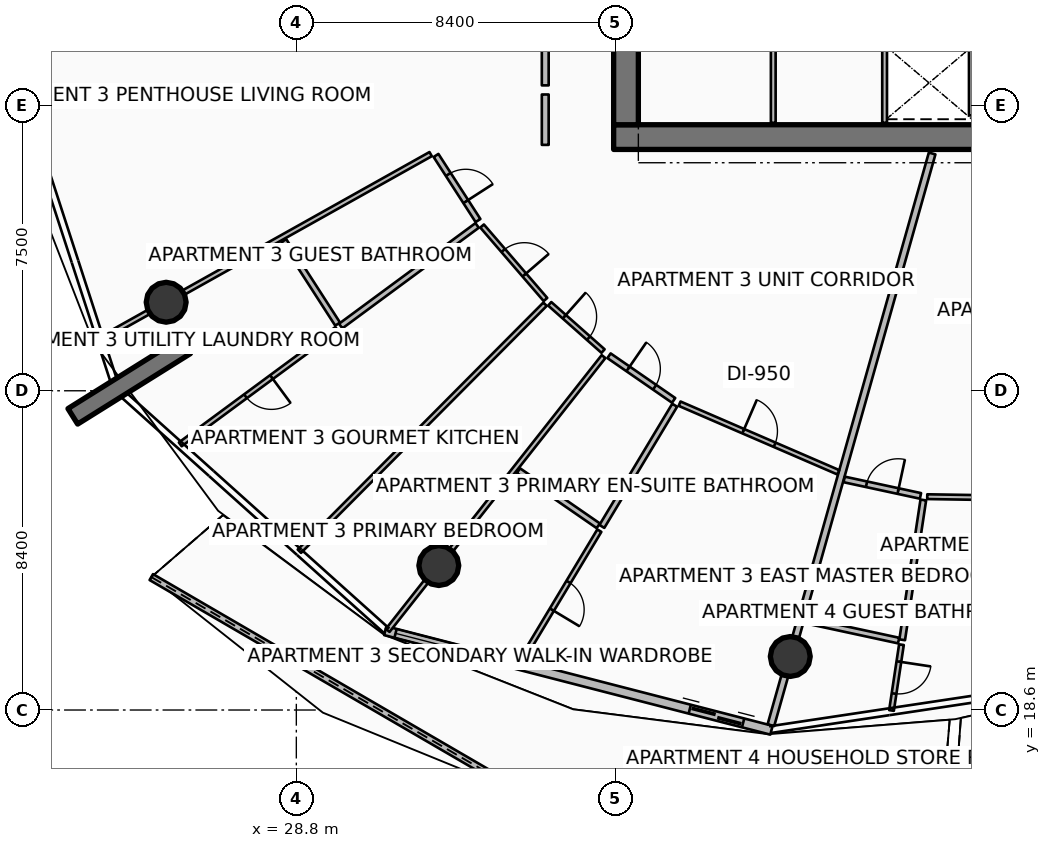
"""IFC4 building model, lengths in metres.
Left out: names, types, materials, properties, quantities, classifications, styles, units other than length and angle.
Written with IfcOpenShell. Run it as: python <this file> out.ifc"""

import sys

from ifc_helpers import new_model, si_unit, direction, frame, frame_2d, origin, origin_2d, place, context, subcontext, project, spatial, polyline, rectangle, circle, outline, extrude, element, fill, save


model = new_model("IFC4")
c1 = context("Model", 3, precision=1e-05, world=origin(), true_north=direction((0.0, 1.0)))
c2 = subcontext(c1, "Body", "Model", "MODEL_VIEW")
j1 = project(units=[si_unit("LENGTHUNIT", "METRE"), si_unit("PLANEANGLEUNIT", "RADIAN")], contexts=[c1])
p1 = place(None, origin())
s1 = spatial("IfcSite", under=j1, at=p1, CompositionType="ELEMENT")
p2 = place(p1, origin())
s2 = spatial("IfcBuilding", under=s1, at=p2, CompositionType="ELEMENT")
p3 = place(p2, frame((0.0, 0.0, 180.3)))
s3 = spatial("IfcBuildingStorey", under=s2, at=p3, CompositionType="ELEMENT", Elevation=180.3)
p4 = place(p3, frame((37.15, 33.675, 0.0), z_axis=(0.0, 0.0, 1.0), x_axis=(1.0, 0.0, 0.0)))
e1 = element("IfcWall", 1, at=p4, inside=s3, PredefinedType="SHEAR", context=c2, shape_type="SweptSolid", body=[
    extrude(rectangle(XDim=9.75, YDim=0.65, at=frame_2d((4.875, 0.0))), origin(), (0.0, 0.0, 1.0), 3.75),
])
p5 = place(p3, frame((37.475, 34.0, 0.0), z_axis=(0.0, 0.0, 1.0), x_axis=(0.0, 1.0, 0.0)))
e2 = element("IfcWall", 2, at=p5, inside=s3, PredefinedType="SHEAR", context=c2, shape_type="SweptSolid", body=[
    extrude(rectangle(XDim=16.0, YDim=0.65, at=frame_2d((8.0, 0.0))), origin(), (0.0, 0.0, 1.0), 3.75),
])
p6 = place(p3, frame((25.886, 28.182, 0.0), z_axis=(0.0, 0.0, 1.0), x_axis=(-0.848033572426, -0.529942506352, 0.0)))
e3 = element("IfcWall", 3, at=p6, inside=s3, PredefinedType="SOLIDWALL", context=c2, shape_type="SweptSolid", body=[
    extrude(rectangle(XDim=3.5, YDim=0.48, at=frame_2d((1.75, 0.0))), origin(), (0.0, 0.0, 1.0), 3.75),
])
for number, where, z_axis, x_axis in (
    (4, (25.375, 29.329, 0.0), (0.0, 0.0, 1.0), (1.0, 0.0, 0.0)),
    (5, (32.549, 22.401, 0.0), (0.0, 0.0, 1.0), (1.0, 0.0, 0.0)),
    (6, (41.798, 20.008, 0.0), (0.0, 0.0, 1.0), (1.0, 0.0, 0.0)),
):
    element("IfcColumn", number, at=place(p3, frame(where, z_axis=z_axis, x_axis=x_axis)), inside=s3, PredefinedType="COLUMN", context=c2, shape_type="SweptSolid", body=[
        extrude(circle(Radius=0.525, at=origin_2d()), origin(), (0.0, 0.0, 1.0), 3.5),
    ])
p7 = place(p3, frame((24.984, 22.098, 0.0), z_axis=(0.0, 0.0, 1.0), x_axis=(0.864391947404, -0.502818616663, 0.0)))
e7 = element("IfcWall", 7, at=p7, inside=s3, PredefinedType="PARAPET", context=c2, shape_type="SweptSolid", body=[
    extrude(outline(polyline([(0.0, 0.0), (11.37, 0.0), (11.37, 1.832), (5.685, 1.853), (0.0, 1.756), (0.0, 0.0)])), frame((0.0, 0.09, 0.0), z_axis=(0.0, -1.0, 0.0), x_axis=(1.0, 0.0, 0.0)), (0.0, 0.0, 1.0), 0.18),
])
p8 = place(p3, frame((46.135, 16.298, 0.0), z_axis=(0.0, 0.0, 1.0), x_axis=(0.956822857871, 0.290671668135, 0.0)))
e8 = element("IfcWall", 8, at=p8, inside=s3, PredefinedType="PARAPET", context=c2, shape_type="SweptSolid", body=[
    extrude(outline(polyline([(0.0, 0.0), (9.598, 0.0), (9.598, 1.148), (4.799, 1.284), (0.0, 1.483), (0.0, 0.0)])), frame((0.0, 0.09, 0.0), z_axis=(0.0, -1.0, 0.0), x_axis=(1.0, 0.0, 0.0)), (0.0, 0.0, 1.0), 0.18),
])
p9 = place(p3, frame((31.14, 20.687, 0.0), z_axis=(0.0, 0.0, 1.0), x_axis=(0.968374028006, -0.249502989727, 0.0)))
e9 = element("IfcWall", 9, at=p9, inside=s3, PredefinedType="SOLIDWALL", context=c2, shape_type="SweptSolid", body=[
    extrude(rectangle(XDim=10.494, YDim=0.24, at=frame_2d((5.247, 0.0))), origin(), (0.0, 0.0, 1.0), 2.45),
])
p10 = place(p9, frame((8.274, 0.0, 0.0)))
e10 = element("IfcOpeningElement", 10, at=p10, cuts=e9, PredefinedType="OPENING", context=c2, shape_type="SweptSolid", body=[
    extrude(rectangle(XDim=1.45, YDim=2.15, at=frame_2d((0.725, 1.075))), frame((0.0, 0.13, 0.0), z_axis=(0.0, -1.0, 0.0), x_axis=(1.0, 0.0, 0.0)), (0.0, 0.0, 1.0), 0.26),
])
p11 = place(p9, frame((0.28, 0.0, 0.65)))
e11 = element("IfcOpeningElement", 11, at=p11, cuts=e9, PredefinedType="OPENING", context=c2, shape_type="SweptSolid", body=[
    extrude(rectangle(XDim=1.6, YDim=1.5, at=frame_2d((0.8, 0.75))), frame((0.0, 0.13, 0.0), z_axis=(0.0, -1.0, 0.0), x_axis=(1.0, 0.0, 0.0)), (0.0, 0.0, 1.0), 0.26),
])
p12 = place(p3, frame((46.58, 34.245, 0.0), z_axis=(0.0, 0.0, 1.0), x_axis=(0.0, 1.0, 0.0)))
e12 = element("IfcWall", 12, at=p12, inside=s3, PredefinedType="PARTITIONING", context=c2, shape_type="SweptSolid", body=[
    extrude(rectangle(XDim=1.71, YDim=0.16, at=frame_2d((0.855, 0.0))), origin(), (0.0, 0.0, 1.0), 3.5),
])
for number, where, z_axis, x_axis in (
    (13, (44.28, 34.05, 0.0), (0.0, 0.0, 1.0), (0.0, 1.0, 0.0)),
    (14, (41.35, 34.05, 0.0), (0.0, 0.0, 1.0), (0.0, 1.0, 0.0)),
):
    element("IfcWall", number, at=place(p3, frame(where, z_axis=z_axis, x_axis=x_axis)), inside=s3, PredefinedType="PARTITIONING", context=c2, shape_type="SweptSolid", body=[
        extrude(rectangle(XDim=2.03, YDim=0.125, at=frame_2d((1.015, 0.0))), origin(), (0.0, 0.0, 1.0), 2.94),
    ])
p13 = place(p3, frame((45.531, 33.244, 0.0), z_axis=(0.0, 0.0, 1.0), x_axis=(-0.271437162306, -0.962456163635, 0.0)))
e15 = element("IfcWall", 15, at=p13, inside=s3, PredefinedType="PARTITIONING", context=c2, shape_type="SweptSolid", body=[
    extrude(rectangle(XDim=15.63, YDim=0.18, at=frame_2d((7.815, 0.0))), origin(), (0.0, 0.0, 1.0), 2.94),
])
p14 = place(p3, frame((35.35, 40.383, 0.0), z_axis=(0.0, 0.0, 1.0), x_axis=(0.0, -1.0, 0.0)))
e16 = element("IfcWall", 16, at=p14, inside=s3, PredefinedType="PARTITIONING", context=c2, shape_type="SweptSolid", body=[
    extrude(rectangle(XDim=5.347, YDim=0.18, at=frame_2d((2.674, 0.0))), origin(), (0.0, 0.0, 1.0), 2.94),
])
p15 = place(p14, frame((2.124, 0.0, 0.0)))
e17 = element("IfcOpeningElement", 17, at=p15, cuts=e16, PredefinedType="OPENING", context=c2, shape_type="SweptSolid", body=[
    extrude(rectangle(XDim=1.1, YDim=2.1, at=frame_2d((0.55, 1.05))), frame((0.0, 0.1, 0.0), z_axis=(0.0, -1.0, 0.0), x_axis=(1.0, 0.0, 0.0)), (0.0, 0.0, 1.0), 0.2),
])
p16 = place(p3, frame((35.35, 34.796, 0.0), z_axis=(0.0, 0.0, 1.0), x_axis=(0.0, -1.0, 0.0)))
e18 = element("IfcWall", 18, at=p16, inside=s3, PredefinedType="PARTITIONING", context=c2, shape_type="SweptSolid", body=[
    extrude(rectangle(XDim=1.326, YDim=0.18, at=frame_2d((0.663, 0.0))), origin(), (0.0, 0.0, 1.0), 2.94),
])
p17 = place(p3, frame((32.334, 33.227, 0.0), z_axis=(0.0, 0.0, 1.0), x_axis=(-0.872500152392, -0.488613839424, 0.0)))
e19 = element("IfcWall", 19, at=p17, inside=s3, PredefinedType="PARTITIONING", context=c2, shape_type="SweptSolid", body=[
    extrude(rectangle(XDim=9.94, YDim=0.125, at=frame_2d((4.97, 0.0))), origin(), (0.0, 0.0, 1.0), 2.94),
])
p18 = place(p3, frame((32.476, 33.192, 0.0), z_axis=(0.0, 0.0, 1.0), x_axis=(0.542143239932, -0.840286086637, 0.0)))
e20 = element("IfcWall", 20, at=p18, inside=s3, PredefinedType="PARTITIONING", context=c2, shape_type="SweptSolid", body=[
    extrude(rectangle(XDim=2.038, YDim=0.15, at=frame_2d((1.019, 0.0))), origin(), (0.0, 0.0, 1.0), 2.94),
])
p19 = place(p18, frame((0.594, 0.0, 0.0)))
e21 = element("IfcOpeningElement", 21, at=p19, cuts=e20, PredefinedType="OPENING", context=c2, shape_type="SweptSolid", body=[
    extrude(rectangle(XDim=0.85, YDim=2.06, at=frame_2d((0.425, 1.03))), frame((0.0, 0.085, 0.0), z_axis=(0.0, -1.0, 0.0), x_axis=(1.0, 0.0, 0.0)), (0.0, 0.0, 1.0), 0.17),
])
p20 = place(p3, frame((28.471, 30.949, 0.0), z_axis=(0.0, 0.0, 1.0), x_axis=(0.542080018781, -0.840326872853, 0.0)))
e22 = element("IfcWall", 22, at=p20, inside=s3, PredefinedType="PARTITIONING", context=c2, shape_type="SweptSolid", body=[
    extrude(rectangle(XDim=2.611, YDim=0.15, at=frame_2d((1.306, 0.0))), origin(), (0.0, 0.0, 1.0), 2.94),
])
p21 = place(p3, frame((33.557, 31.35, 0.0), z_axis=(0.0, 0.0, 1.0), x_axis=(-0.804841149106, -0.593490290322, 0.0)))
e23 = element("IfcWall", 23, at=p21, inside=s3, PredefinedType="PARTITIONING", context=c2, shape_type="SweptSolid", body=[
    extrude(rectangle(XDim=4.46, YDim=0.15, at=frame_2d((2.23, 0.0))), origin(), (0.0, 0.0, 1.0), 2.94),
])
p22 = place(p3, frame((29.863, 28.626, 0.0), z_axis=(0.0, 0.0, 1.0), x_axis=(-0.804842237675, -0.593488814094, 0.0)))
e24 = element("IfcWall", 24, at=p22, inside=s3, PredefinedType="PARTITIONING", context=c2, shape_type="SweptSolid", body=[
    extrude(rectangle(XDim=5.115, YDim=0.125, at=frame_2d((2.558, 0.0))), origin(), (0.0, 0.0, 1.0), 2.94),
])
p23 = place(p22, frame((2.133, 0.0, 0.0)))
e25 = element("IfcOpeningElement", 25, at=p23, cuts=e24, PredefinedType="OPENING", context=c2, shape_type="SweptSolid", body=[
    extrude(rectangle(XDim=0.85, YDim=2.06, at=frame_2d((0.425, 1.03))), frame((0.0, 0.073, 0.0), z_axis=(0.0, -1.0, 0.0), x_axis=(1.0, 0.0, 0.0)), (0.0, 0.0, 1.0), 0.145),
])
p24 = place(p3, frame((35.344, 29.277, 0.0), z_axis=(0.0, 0.0, 1.0), x_axis=(-0.705226489462, -0.708982086206, 0.0)))
e26 = element("IfcWall", 26, at=p24, inside=s3, PredefinedType="PARTITIONING", context=c2, shape_type="SweptSolid", body=[
    extrude(rectangle(XDim=9.166, YDim=0.125, at=frame_2d((4.583, 0.0))), origin(), (0.0, 0.0, 1.0), 2.94),
])
p25 = place(p3, frame((33.688, 31.335, 0.0), z_axis=(0.0, 0.0, 1.0), x_axis=(0.653119308398, -0.757255022431, 0.0)))
e27 = element("IfcWall", 27, at=p25, inside=s3, PredefinedType="PARTITIONING", context=c2, shape_type="SweptSolid", body=[
    extrude(rectangle(XDim=2.553, YDim=0.125, at=frame_2d((1.277, 0.0))), origin(), (0.0, 0.0, 1.0), 2.94),
])
p26 = place(p25, frame((0.852, 0.0, 0.0)))
e28 = element("IfcOpeningElement", 28, at=p26, cuts=e27, PredefinedType="OPENING", context=c2, shape_type="SweptSolid", body=[
    extrude(rectangle(XDim=0.85, YDim=2.06, at=frame_2d((0.425, 1.03))), frame((0.0, 0.073, 0.0), z_axis=(0.0, -1.0, 0.0), x_axis=(1.0, 0.0, 0.0)), (0.0, 0.0, 1.0), 0.145),
])
p27 = place(p3, frame((35.468, 29.288, 0.0), z_axis=(0.0, 0.0, 1.0), x_axis=(0.748399816021, -0.663247853656, 0.0)))
e29 = element("IfcWall", 29, at=p27, inside=s3, PredefinedType="PARTITIONING", context=c2, shape_type="SweptSolid", body=[
    extrude(rectangle(XDim=1.875, YDim=0.125, at=frame_2d((0.938, 0.0))), origin(), (0.0, 0.0, 1.0), 2.94),
])
p28 = place(p27, frame((0.512, 0.0, 0.0)))
e30 = element("IfcOpeningElement", 30, at=p28, cuts=e29, PredefinedType="OPENING", context=c2, shape_type="SweptSolid", body=[
    extrude(rectangle(XDim=0.85, YDim=2.06, at=frame_2d((0.425, 1.03))), frame((0.0, 0.073, 0.0), z_axis=(0.0, -1.0, 0.0), x_axis=(1.0, 0.0, 0.0)), (0.0, 0.0, 1.0), 0.145),
])
p29 = place(p3, frame((36.884, 27.9, 0.0), z_axis=(0.0, 0.0, 1.0), x_axis=(-0.619094580594, -0.785316433216, 0.0)))
e31 = element("IfcWall", 31, at=p29, inside=s3, PredefinedType="PARTITIONING", context=c2, shape_type="SweptSolid", body=[
    extrude(rectangle(XDim=9.175, YDim=0.125, at=frame_2d((4.588, 0.0))), origin(), (0.0, 0.0, 1.0), 2.94),
])
p30 = place(p3, frame((37.028, 27.921, 0.0), z_axis=(0.0, 0.0, 1.0), x_axis=(0.82286796048, -0.56823262808, 0.0)))
e32 = element("IfcWall", 32, at=p30, inside=s3, PredefinedType="PARTITIONING", context=c2, shape_type="SweptSolid", body=[
    extrude(rectangle(XDim=2.066, YDim=0.15, at=frame_2d((1.033, 0.0))), origin(), (0.0, 0.0, 1.0), 2.94),
])
p31 = place(p30, frame((0.608, 0.0, 0.0)))
e33 = element("IfcOpeningElement", 33, at=p31, cuts=e32, PredefinedType="OPENING", context=c2, shape_type="SweptSolid", body=[
    extrude(rectangle(XDim=0.85, YDim=2.06, at=frame_2d((0.425, 1.03))), frame((0.0, 0.085, 0.0), z_axis=(0.0, -1.0, 0.0), x_axis=(1.0, 0.0, 0.0)), (0.0, 0.0, 1.0), 0.17),
])
p32 = place(p3, frame((34.645, 24.898, 0.0), z_axis=(0.0, 0.0, 1.0), x_axis=(0.822814907258, -0.568309447743, 0.0)))
e34 = element("IfcWall", 34, at=p32, inside=s3, PredefinedType="PARTITIONING", context=c2, shape_type="SweptSolid", body=[
    extrude(rectangle(XDim=2.553, YDim=0.15, at=frame_2d((1.276, 0.0))), origin(), (0.0, 0.0, 1.0), 2.94),
])
p33 = place(p3, frame((38.756, 26.619, 0.0), z_axis=(0.0, 0.0, 1.0), x_axis=(-0.515122954907, -0.857116293934, 0.0)))
e35 = element("IfcWall", 35, at=p33, inside=s3, PredefinedType="PARTITIONING", context=c2, shape_type="SweptSolid", body=[
    extrude(rectangle(XDim=3.72, YDim=0.15, at=frame_2d((1.86, 0.0))), origin(), (0.0, 0.0, 1.0), 2.94),
])
p34 = place(p3, frame((36.773, 23.319, 0.0), z_axis=(0.0, 0.0, 1.0), x_axis=(-0.515150775859, -0.857099573056, 0.0)))
e36 = element("IfcWall", 36, at=p34, inside=s3, PredefinedType="PARTITIONING", context=c2, shape_type="SweptSolid", body=[
    extrude(rectangle(XDim=4.0, YDim=0.125, at=frame_2d((2.0, 0.0))), origin(), (0.0, 0.0, 1.0), 2.94),
])
p35 = place(p34, frame((1.575, 0.0, 0.0)))
e37 = element("IfcOpeningElement", 37, at=p35, cuts=e36, PredefinedType="OPENING", context=c2, shape_type="SweptSolid", body=[
    extrude(rectangle(XDim=0.85, YDim=2.06, at=frame_2d((0.425, 1.03))), frame((0.0, 0.073, 0.0), z_axis=(0.0, -1.0, 0.0), x_axis=(1.0, 0.0, 0.0)), (0.0, 0.0, 1.0), 0.145),
])
p36 = place(p3, frame((38.885, 26.66, 0.0), z_axis=(0.0, 0.0, 1.0), x_axis=(0.91789982616, -0.396812183705, 0.0)))
e38 = element("IfcWall", 38, at=p36, inside=s3, PredefinedType="PARTITIONING", context=c2, shape_type="SweptSolid", body=[
    extrude(rectangle(XDim=4.55, YDim=0.125, at=frame_2d((2.275, 0.0))), origin(), (0.0, 0.0, 1.0), 2.94),
])
p37 = place(p36, frame((1.825, 0.0, 0.0)))
e39 = element("IfcOpeningElement", 39, at=p37, cuts=e38, PredefinedType="OPENING", context=c2, shape_type="SweptSolid", body=[
    extrude(rectangle(XDim=0.9, YDim=2.08, at=frame_2d((0.45, 1.04))), frame((0.0, 0.073, 0.0), z_axis=(0.0, -1.0, 0.0), x_axis=(1.0, 0.0, 0.0)), (0.0, 0.0, 1.0), 0.145),
])
p38 = place(p3, frame((43.215, 24.667, 0.0), z_axis=(0.0, 0.0, 1.0), x_axis=(0.977507597701, -0.210900204925, 0.0)))
e40 = element("IfcWall", 40, at=p38, inside=s3, PredefinedType="PARTITIONING", context=c2, shape_type="SweptSolid", body=[
    extrude(rectangle(XDim=2.055, YDim=0.15, at=frame_2d((1.027, 0.0))), origin(), (0.0, 0.0, 1.0), 2.94),
])
p39 = place(p38, frame((0.602, 0.0, 0.0)))
e41 = element("IfcOpeningElement", 41, at=p39, cuts=e40, PredefinedType="OPENING", context=c2, shape_type="SweptSolid", body=[
    extrude(rectangle(XDim=0.85, YDim=2.06, at=frame_2d((0.425, 1.03))), frame((0.0, 0.085, 0.0), z_axis=(0.0, -1.0, 0.0), x_axis=(1.0, 0.0, 0.0)), (0.0, 0.0, 1.0), 0.17),
])
p40 = place(p3, frame((42.17, 20.962, 0.0), z_axis=(0.0, 0.0, 1.0), x_axis=(0.977505473959, -0.210910048076, 0.0)))
e42 = element("IfcWall", 42, at=p40, inside=s3, PredefinedType="PARTITIONING", context=c2, shape_type="SweptSolid", body=[
    extrude(rectangle(XDim=2.535, YDim=0.15, at=frame_2d((1.268, 0.0))), origin(), (0.0, 0.0, 1.0), 2.94),
])
p41 = place(p3, frame((45.298, 24.126, 0.0), z_axis=(0.0, 0.0, 1.0), x_axis=(-0.149437927454, -0.988771108922, 0.0)))
e43 = element("IfcWall", 43, at=p41, inside=s3, PredefinedType="PARTITIONING", context=c2, shape_type="SweptSolid", body=[
    extrude(rectangle(XDim=3.72, YDim=0.15, at=frame_2d((1.86, 0.0))), origin(), (0.0, 0.0, 1.0), 2.94),
])
p42 = place(p3, frame((44.723, 20.319, 0.0), z_axis=(0.0, 0.0, 1.0), x_axis=(-0.14945844671, -0.988768007526, 0.0)))
e44 = element("IfcWall", 44, at=p42, inside=s3, PredefinedType="PARTITIONING", context=c2, shape_type="SweptSolid", body=[
    extrude(rectangle(XDim=1.751, YDim=0.125, at=frame_2d((0.875, 0.0))), origin(), (0.0, 0.0, 1.0), 2.94),
])
p43 = place(p42, frame((0.451, 0.0, 0.0)))
e45 = element("IfcOpeningElement", 45, at=p43, cuts=e44, PredefinedType="OPENING", context=c2, shape_type="SweptSolid", body=[
    extrude(rectangle(XDim=0.85, YDim=2.06, at=frame_2d((0.425, 1.03))), frame((0.0, 0.073, 0.0), z_axis=(0.0, -1.0, 0.0), x_axis=(1.0, 0.0, 0.0)), (0.0, 0.0, 1.0), 0.145),
])
p44 = place(p3, frame((45.402, 24.214, 0.0), z_axis=(0.0, 0.0, 1.0), x_axis=(0.999870557478, -0.016089384368, 0.0)))
e46 = element("IfcWall", 46, at=p44, inside=s3, PredefinedType="PARTITIONING", context=c2, shape_type="SweptSolid", body=[
    extrude(rectangle(XDim=4.613, YDim=0.125, at=frame_2d((2.306, 0.0))), origin(), (0.0, 0.0, 1.0), 2.94),
])
p45 = place(p44, frame((1.856, 0.0, 0.0)))
e47 = element("IfcOpeningElement", 47, at=p45, cuts=e46, PredefinedType="OPENING", context=c2, shape_type="SweptSolid", body=[
    extrude(rectangle(XDim=0.9, YDim=2.08, at=frame_2d((0.45, 1.04))), frame((0.0, 0.073, 0.0), z_axis=(0.0, -1.0, 0.0), x_axis=(1.0, 0.0, 0.0)), (0.0, 0.0, 1.0), 0.145),
])
p46 = place(p10, origin())
e48 = element("IfcDoor", 48, at=p46, inside=s3, OperationType="DOUBLE_DOOR_SLIDING", PredefinedType="DOOR", context=c2, shape_type="SweptSolid", body=[
    extrude(rectangle(XDim=1.45, YDim=2.15, at=frame_2d((0.725, 1.075))), frame((0.0, 0.025, 0.0), z_axis=(0.0, -1.0, 0.0), x_axis=(1.0, 0.0, 0.0)), (0.0, 0.0, 1.0), 0.05),
])
fill(e10, e48)
p47 = place(p11, origin())
e49 = element("IfcWindow", 49, at=p47, inside=s3, PartitioningType="SINGLE_PANEL", PredefinedType="WINDOW", context=c2, shape_type="SweptSolid", body=[
    extrude(rectangle(XDim=1.6, YDim=1.5, at=frame_2d((0.8, 0.75))), frame((0.0, 0.03, 0.0), z_axis=(0.0, -1.0, 0.0), x_axis=(1.0, 0.0, 0.0)), (0.0, 0.0, 1.0), 0.06),
])
fill(e11, e49)
p48 = place(p19, origin())
e50 = element("IfcDoor", 50, at=p48, inside=s3, OperationType="SINGLE_SWING_RIGHT", PredefinedType="DOOR", context=c2, shape_type="SweptSolid", body=[
    extrude(rectangle(XDim=0.85, YDim=2.06, at=frame_2d((0.425, 1.03))), frame((0.0, 0.025, 0.0), z_axis=(0.0, -1.0, 0.0), x_axis=(1.0, 0.0, 0.0)), (0.0, 0.0, 1.0), 0.05),
])
fill(e21, e50)
p49 = place(p23, origin())
e51 = element("IfcDoor", 51, at=p49, inside=s3, OperationType="SINGLE_SWING_LEFT", PredefinedType="DOOR", context=c2, shape_type="SweptSolid", body=[
    extrude(rectangle(XDim=0.85, YDim=2.06, at=frame_2d((0.425, 1.03))), frame((0.0, 0.025, 0.0), z_axis=(0.0, -1.0, 0.0), x_axis=(1.0, 0.0, 0.0)), (0.0, 0.0, 1.0), 0.05),
])
fill(e25, e51)
p50 = place(p26, origin())
e52 = element("IfcDoor", 52, at=p50, inside=s3, OperationType="SINGLE_SWING_RIGHT", PredefinedType="DOOR", context=c2, shape_type="SweptSolid", body=[
    extrude(rectangle(XDim=0.85, YDim=2.06, at=frame_2d((0.425, 1.03))), frame((0.0, 0.025, 0.0), z_axis=(0.0, -1.0, 0.0), x_axis=(1.0, 0.0, 0.0)), (0.0, 0.0, 1.0), 0.05),
])
fill(e28, e52)
p51 = place(p28, origin())
e53 = element("IfcDoor", 53, at=p51, inside=s3, OperationType="SINGLE_SWING_LEFT", PredefinedType="DOOR", context=c2, shape_type="SweptSolid", body=[
    extrude(rectangle(XDim=0.85, YDim=2.06, at=frame_2d((0.425, 1.03))), frame((0.0, 0.025, 0.0), z_axis=(0.0, -1.0, 0.0), x_axis=(1.0, 0.0, 0.0)), (0.0, 0.0, 1.0), 0.05),
])
fill(e30, e53)
p52 = place(p31, origin())
e54 = element("IfcDoor", 54, at=p52, inside=s3, OperationType="SINGLE_SWING_LEFT", PredefinedType="DOOR", context=c2, shape_type="SweptSolid", body=[
    extrude(rectangle(XDim=0.85, YDim=2.06, at=frame_2d((0.425, 1.03))), frame((0.0, 0.025, 0.0), z_axis=(0.0, -1.0, 0.0), x_axis=(1.0, 0.0, 0.0)), (0.0, 0.0, 1.0), 0.05),
])
fill(e33, e54)
p53 = place(p35, origin())
e55 = element("IfcDoor", 55, at=p53, inside=s3, OperationType="SINGLE_SWING_RIGHT", PredefinedType="DOOR", context=c2, shape_type="SweptSolid", body=[
    extrude(rectangle(XDim=0.85, YDim=2.06, at=frame_2d((0.425, 1.03))), frame((0.0, 0.025, 0.0), z_axis=(0.0, -1.0, 0.0), x_axis=(1.0, 0.0, 0.0)), (0.0, 0.0, 1.0), 0.05),
])
fill(e37, e55)
p54 = place(p37, origin())
e56 = element("IfcDoor", 56, at=p54, inside=s3, OperationType="SINGLE_SWING_LEFT", PredefinedType="DOOR", context=c2, shape_type="SweptSolid", body=[
    extrude(rectangle(XDim=0.9, YDim=2.08, at=frame_2d((0.45, 1.04))), frame((0.0, 0.025, 0.0), z_axis=(0.0, -1.0, 0.0), x_axis=(1.0, 0.0, 0.0)), (0.0, 0.0, 1.0), 0.05),
])
fill(e39, e56)
p55 = place(p39, origin())
e57 = element("IfcDoor", 57, at=p55, inside=s3, OperationType="SINGLE_SWING_RIGHT", PredefinedType="DOOR", context=c2, shape_type="SweptSolid", body=[
    extrude(rectangle(XDim=0.85, YDim=2.06, at=frame_2d((0.425, 1.03))), frame((0.0, 0.025, 0.0), z_axis=(0.0, -1.0, 0.0), x_axis=(1.0, 0.0, 0.0)), (0.0, 0.0, 1.0), 0.05),
])
fill(e41, e57)
p56 = place(p43, origin())
e58 = element("IfcDoor", 58, at=p56, inside=s3, OperationType="SINGLE_SWING_LEFT", PredefinedType="DOOR", context=c2, shape_type="SweptSolid", body=[
    extrude(rectangle(XDim=0.85, YDim=2.06, at=frame_2d((0.425, 1.03))), frame((0.0, 0.025, 0.0), z_axis=(0.0, -1.0, 0.0), x_axis=(1.0, 0.0, 0.0)), (0.0, 0.0, 1.0), 0.05),
])
fill(e45, e58)
save(model, sys.argv[1])
